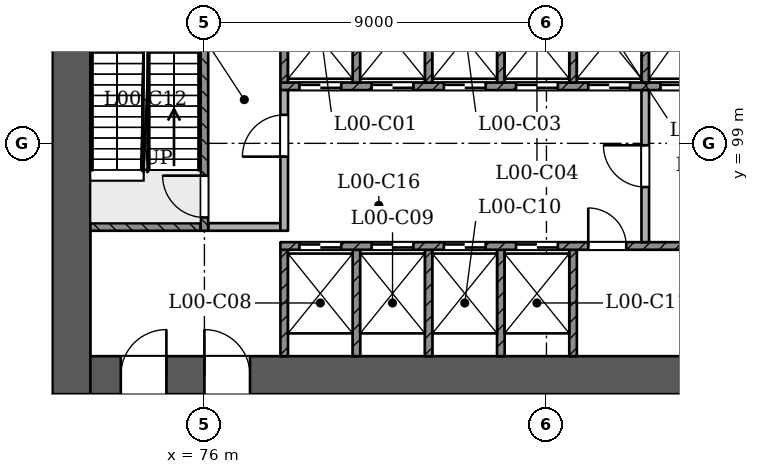
"""IFC4 building model, lengths in metres.
Left out: names, types, materials, properties, quantities, classifications, styles, units other than length and angle.
Written with IfcOpenShell. Run it as: python <this file> out.ifc"""

import sys

from ifc_helpers import new_model, si_unit, direction, frame, frame_2d, origin, place, context, subcontext, project, spatial, rectangle, extrude, element, fill, save


model = new_model("IFC4")
c1 = context("Model", 3, precision=1e-05, world=origin(), true_north=direction((0.0, 1.0)))
c2 = subcontext(c1, "Body", "Model", "MODEL_VIEW")
j1 = project(units=[si_unit("LENGTHUNIT", "METRE"), si_unit("PLANEANGLEUNIT", "RADIAN")], contexts=[c1])
p1 = place(None, origin())
s1 = spatial("IfcSite", under=j1, at=p1, CompositionType="ELEMENT")
p2 = place(p1, origin())
s2 = spatial("IfcBuilding", under=s1, at=p2, CompositionType="ELEMENT")
p3 = place(p2, origin())
s3 = spatial("IfcBuildingStorey", under=s2, at=p3, CompositionType="ELEMENT", Elevation=0.0)
p4 = place(p3, frame((72.5, 92.9, 0.0), z_axis=(0.0, 0.0, 1.0), x_axis=(1.0, 0.0, 0.0)))
e1 = element("IfcWall", 1, at=p4, inside=s3, PredefinedType="SHEAR", context=c2, shape_type="SweptSolid", body=[
    extrude(rectangle(XDim=25.5, YDim=1.0, at=frame_2d((12.75, 0.0))), origin(), (0.0, 0.0, 1.0), 9.0),
])
p5 = place(p4, frame((1.3, 0.0, 0.0)))
e2 = element("IfcOpeningElement", 2, at=p5, cuts=e1, PredefinedType="OPENING", context=c2, shape_type="SweptSolid", body=[
    extrude(rectangle(XDim=1.2, YDim=2.1, at=frame_2d((0.6, 1.05))), frame((0.0, 0.51, 0.0), z_axis=(0.0, -1.0, 0.0), x_axis=(1.0, 0.0, 0.0)), (0.0, 0.0, 1.0), 1.021),
])
p6 = place(p4, frame((3.5, 0.0, 0.0)))
e3 = element("IfcOpeningElement", 3, at=p6, cuts=e1, PredefinedType="OPENING", context=c2, shape_type="SweptSolid", body=[
    extrude(rectangle(XDim=1.2, YDim=2.1, at=frame_2d((0.6, 1.05))), frame((0.0, 0.51, 0.0), z_axis=(0.0, -1.0, 0.0), x_axis=(1.0, 0.0, 0.0)), (0.0, 0.0, 1.0), 1.021),
])
p7 = place(p4, frame((18.4, 0.0, 0.0)))
e4 = element("IfcOpeningElement", 4, at=p7, cuts=e1, PredefinedType="OPENING", context=c2, shape_type="SweptSolid", body=[
    extrude(rectangle(XDim=1.0, YDim=2.1, at=frame_2d((0.5, 1.05))), frame((0.0, 0.51, 0.0), z_axis=(0.0, -1.0, 0.0), x_axis=(1.0, 0.0, 0.0)), (0.0, 0.0, 1.0), 1.021),
])
p8 = place(p3, frame((72.5, 103.9, 0.0), z_axis=(0.0, 0.0, 1.0), x_axis=(0.0, -1.0, 0.0)))
e5 = element("IfcWall", 5, at=p8, inside=s3, PredefinedType="SHEAR", context=c2, shape_type="SweptSolid", body=[
    extrude(rectangle(XDim=11.5, YDim=1.0, at=frame_2d((5.75, 0.0))), origin(), (0.0, 0.0, 1.0), 9.0),
])
for number, where, z_axis, x_axis in (
    (6, (78.1, 93.4, 0.0), (0.0, 0.0, 1.0), (0.0, 1.0, 0.0)),
    (7, (80.0, 93.4, 0.0), (0.0, 0.0, 1.0), (0.0, 1.0, 0.0)),
    (8, (81.9, 93.4, 0.0), (0.0, 0.0, 1.0), (0.0, 1.0, 0.0)),
    (9, (83.8, 93.4, 0.0), (0.0, 0.0, 1.0), (0.0, 1.0, 0.0)),
    (10, (85.7, 93.4, 0.0), (0.0, 0.0, 1.0), (0.0, 1.0, 0.0)),
):
    element("IfcWall", number, at=place(p3, frame(where, z_axis=z_axis, x_axis=x_axis)), inside=s3, PredefinedType="SOLIDWALL", context=c2, shape_type="SweptSolid", body=[
        extrude(rectangle(XDim=2.8, YDim=0.2, at=frame_2d((1.4, 0.0))), origin(), (0.0, 0.0, 1.0), 8.55),
    ])
p9 = place(p3, frame((78.0, 96.3, 0.0), z_axis=(0.0, 0.0, 1.0), x_axis=(1.0, 0.0, 0.0)))
e11 = element("IfcWall", 11, at=p9, inside=s3, PredefinedType="SOLIDWALL", context=c2, shape_type="SweptSolid", body=[
    extrude(rectangle(XDim=13.5, YDim=0.2, at=frame_2d((6.75, 0.0))), origin(), (0.0, 0.0, 1.0), 8.55),
])
p10 = place(p9, frame((0.5, 0.0, 0.0)))
e12 = element("IfcOpeningElement", 12, at=p10, cuts=e11, PredefinedType="OPENING", context=c2, shape_type="SweptSolid", body=[
    extrude(rectangle(XDim=1.1, YDim=2.1, at=frame_2d((0.55, 1.05))), frame((0.0, 0.11, 0.0), z_axis=(0.0, -1.0, 0.0), x_axis=(1.0, 0.0, 0.0)), (0.0, 0.0, 1.0), 0.221),
])
p11 = place(p9, frame((2.4, 0.0, 0.0)))
e13 = element("IfcOpeningElement", 13, at=p11, cuts=e11, PredefinedType="OPENING", context=c2, shape_type="SweptSolid", body=[
    extrude(rectangle(XDim=1.1, YDim=2.1, at=frame_2d((0.55, 1.05))), frame((0.0, 0.11, 0.0), z_axis=(0.0, -1.0, 0.0), x_axis=(1.0, 0.0, 0.0)), (0.0, 0.0, 1.0), 0.221),
])
p12 = place(p9, frame((4.3, 0.0, 0.0)))
e14 = element("IfcOpeningElement", 14, at=p12, cuts=e11, PredefinedType="OPENING", context=c2, shape_type="SweptSolid", body=[
    extrude(rectangle(XDim=1.1, YDim=2.1, at=frame_2d((0.55, 1.05))), frame((0.0, 0.11, 0.0), z_axis=(0.0, -1.0, 0.0), x_axis=(1.0, 0.0, 0.0)), (0.0, 0.0, 1.0), 0.221),
])
p13 = place(p9, frame((6.2, 0.0, 0.0)))
e15 = element("IfcOpeningElement", 15, at=p13, cuts=e11, PredefinedType="OPENING", context=c2, shape_type="SweptSolid", body=[
    extrude(rectangle(XDim=1.1, YDim=2.1, at=frame_2d((0.55, 1.05))), frame((0.0, 0.11, 0.0), z_axis=(0.0, -1.0, 0.0), x_axis=(1.0, 0.0, 0.0)), (0.0, 0.0, 1.0), 0.221),
])
p14 = place(p9, frame((8.1, 0.0, 0.0)))
e16 = element("IfcOpeningElement", 16, at=p14, cuts=e11, PredefinedType="OPENING", context=c2, shape_type="SweptSolid", body=[
    extrude(rectangle(XDim=1.0, YDim=2.1, at=frame_2d((0.5, 1.05))), frame((0.0, 0.11, 0.0), z_axis=(0.0, -1.0, 0.0), x_axis=(1.0, 0.0, 0.0)), (0.0, 0.0, 1.0), 0.221),
])
p15 = place(p3, frame((87.6, 96.4, 0.0), z_axis=(0.0, 0.0, 1.0), x_axis=(0.0, 1.0, 0.0)))
e17 = element("IfcWall", 17, at=p15, inside=s3, PredefinedType="PARTITIONING", context=c2, shape_type="SweptSolid", body=[
    extrude(rectangle(XDim=4.0, YDim=0.2, at=frame_2d((2.0, 0.0))), origin(), (0.0, 0.0, 1.0), 8.55),
])
p16 = place(p15, frame((1.45, 0.0, 0.0)))
e18 = element("IfcOpeningElement", 18, at=p16, cuts=e17, PredefinedType="OPENING", context=c2, shape_type="SweptSolid", body=[
    extrude(rectangle(XDim=1.1, YDim=2.1, at=frame_2d((0.55, 1.05))), frame((0.0, 0.11, 0.0), z_axis=(0.0, -1.0, 0.0), x_axis=(1.0, 0.0, 0.0)), (0.0, 0.0, 1.0), 0.221),
])
p17 = place(p3, frame((73.0, 96.8, 0.0), z_axis=(0.0, 0.0, 1.0), x_axis=(1.0, 0.0, 0.0)))
e19 = element("IfcWall", 19, at=p17, inside=s3, PredefinedType="SOLIDWALL", context=c2, shape_type="SweptSolid", body=[
    extrude(rectangle(XDim=2.9, YDim=0.2, at=frame_2d((1.45, 0.0))), origin(), (0.0, 0.0, 1.0), 8.55),
])
p18 = place(p3, frame((76.0, 96.7, 0.0), z_axis=(0.0, 0.0, 1.0), x_axis=(0.0, 1.0, 0.0)))
e20 = element("IfcWall", 20, at=p18, inside=s3, PredefinedType="SOLIDWALL", context=c2, shape_type="SweptSolid", body=[
    extrude(rectangle(XDim=6.7, YDim=0.2, at=frame_2d((3.35, 0.0))), origin(), (0.0, 0.0, 1.0), 8.55),
])
p19 = place(p18, frame((0.35, 0.0, 0.0)))
e21 = element("IfcOpeningElement", 21, at=p19, cuts=e20, PredefinedType="OPENING", context=c2, shape_type="SweptSolid", body=[
    extrude(rectangle(XDim=1.1, YDim=2.1, at=frame_2d((0.55, 1.05))), frame((0.0, 0.11, 0.0), z_axis=(0.0, -1.0, 0.0), x_axis=(1.0, 0.0, 0.0)), (0.0, 0.0, 1.0), 0.221),
])
p20 = place(p3, frame((76.1, 96.8, 0.0), z_axis=(0.0, 0.0, 1.0), x_axis=(1.0, 0.0, 0.0)))
e22 = element("IfcWall", 22, at=p20, inside=s3, PredefinedType="PARTITIONING", context=c2, shape_type="SweptSolid", body=[
    extrude(rectangle(XDim=1.9, YDim=0.2, at=frame_2d((0.95, 0.0))), origin(), (0.0, 0.0, 1.0), 8.55),
])
p21 = place(p3, frame((78.1, 96.7, 0.0), z_axis=(0.0, 0.0, 1.0), x_axis=(0.0, 1.0, 0.0)))
e23 = element("IfcWall", 23, at=p21, inside=s3, PredefinedType="PARTITIONING", context=c2, shape_type="SweptSolid", body=[
    extrude(rectangle(XDim=3.7, YDim=0.2, at=frame_2d((1.85, 0.0))), origin(), (0.0, 0.0, 1.0), 8.55),
])
p22 = place(p21, frame((1.95, 0.0, 0.0)))
e24 = element("IfcOpeningElement", 24, at=p22, cuts=e23, PredefinedType="OPENING", context=c2, shape_type="SweptSolid", body=[
    extrude(rectangle(XDim=1.1, YDim=2.1, at=frame_2d((0.55, 1.05))), frame((0.0, 0.11, 0.0), z_axis=(0.0, -1.0, 0.0), x_axis=(1.0, 0.0, 0.0)), (0.0, 0.0, 1.0), 0.221),
])
p23 = place(p3, frame((78.0, 100.5, 0.0), z_axis=(0.0, 0.0, 1.0), x_axis=(1.0, 0.0, 0.0)))
e25 = element("IfcWall", 25, at=p23, inside=s3, PredefinedType="SOLIDWALL", context=c2, shape_type="SweptSolid", body=[
    extrude(rectangle(XDim=13.5, YDim=0.2, at=frame_2d((6.75, 0.0))), origin(), (0.0, 0.0, 1.0), 8.55),
])
p24 = place(p23, frame((0.5, 0.0, 0.0)))
e26 = element("IfcOpeningElement", 26, at=p24, cuts=e25, PredefinedType="OPENING", context=c2, shape_type="SweptSolid", body=[
    extrude(rectangle(XDim=1.1, YDim=2.1, at=frame_2d((0.55, 1.05))), frame((0.0, 0.11, 0.0), z_axis=(0.0, -1.0, 0.0), x_axis=(1.0, 0.0, 0.0)), (0.0, 0.0, 1.0), 0.221),
])
p25 = place(p23, frame((2.4, 0.0, 0.0)))
e27 = element("IfcOpeningElement", 27, at=p25, cuts=e25, PredefinedType="OPENING", context=c2, shape_type="SweptSolid", body=[
    extrude(rectangle(XDim=1.1, YDim=2.1, at=frame_2d((0.55, 1.05))), frame((0.0, 0.11, 0.0), z_axis=(0.0, -1.0, 0.0), x_axis=(1.0, 0.0, 0.0)), (0.0, 0.0, 1.0), 0.221),
])
p26 = place(p23, frame((4.3, 0.0, 0.0)))
e28 = element("IfcOpeningElement", 28, at=p26, cuts=e25, PredefinedType="OPENING", context=c2, shape_type="SweptSolid", body=[
    extrude(rectangle(XDim=1.1, YDim=2.1, at=frame_2d((0.55, 1.05))), frame((0.0, 0.11, 0.0), z_axis=(0.0, -1.0, 0.0), x_axis=(1.0, 0.0, 0.0)), (0.0, 0.0, 1.0), 0.221),
])
p27 = place(p23, frame((6.2, 0.0, 0.0)))
e29 = element("IfcOpeningElement", 29, at=p27, cuts=e25, PredefinedType="OPENING", context=c2, shape_type="SweptSolid", body=[
    extrude(rectangle(XDim=1.1, YDim=2.1, at=frame_2d((0.55, 1.05))), frame((0.0, 0.11, 0.0), z_axis=(0.0, -1.0, 0.0), x_axis=(1.0, 0.0, 0.0)), (0.0, 0.0, 1.0), 0.221),
])
p28 = place(p23, frame((8.1, 0.0, 0.0)))
e30 = element("IfcOpeningElement", 30, at=p28, cuts=e25, PredefinedType="OPENING", context=c2, shape_type="SweptSolid", body=[
    extrude(rectangle(XDim=1.1, YDim=2.1, at=frame_2d((0.55, 1.05))), frame((0.0, 0.11, 0.0), z_axis=(0.0, -1.0, 0.0), x_axis=(1.0, 0.0, 0.0)), (0.0, 0.0, 1.0), 0.221),
])
p29 = place(p23, frame((10.0, 0.0, 0.0)))
e31 = element("IfcOpeningElement", 31, at=p29, cuts=e25, PredefinedType="OPENING", context=c2, shape_type="SweptSolid", body=[
    extrude(rectangle(XDim=1.1, YDim=2.1, at=frame_2d((0.55, 1.05))), frame((0.0, 0.11, 0.0), z_axis=(0.0, -1.0, 0.0), x_axis=(1.0, 0.0, 0.0)), (0.0, 0.0, 1.0), 0.221),
])
p30 = place(p23, frame((11.9, 0.0, 0.0)))
e32 = element("IfcOpeningElement", 32, at=p30, cuts=e25, PredefinedType="OPENING", context=c2, shape_type="SweptSolid", body=[
    extrude(rectangle(XDim=1.1, YDim=2.1, at=frame_2d((0.55, 1.05))), frame((0.0, 0.11, 0.0), z_axis=(0.0, -1.0, 0.0), x_axis=(1.0, 0.0, 0.0)), (0.0, 0.0, 1.0), 0.221),
])
for number, where, z_axis, x_axis in (
    (33, (78.1, 100.6, 0.0), (0.0, 0.0, 1.0), (0.0, 1.0, 0.0)),
    (34, (80.0, 100.6, 0.0), (0.0, 0.0, 1.0), (0.0, 1.0, 0.0)),
    (35, (81.9, 100.6, 0.0), (0.0, 0.0, 1.0), (0.0, 1.0, 0.0)),
    (36, (83.8, 100.6, 0.0), (0.0, 0.0, 1.0), (0.0, 1.0, 0.0)),
    (37, (85.7, 100.6, 0.0), (0.0, 0.0, 1.0), (0.0, 1.0, 0.0)),
    (38, (87.6, 100.6, 0.0), (0.0, 0.0, 1.0), (0.0, 1.0, 0.0)),
):
    element("IfcWall", number, at=place(p3, frame(where, z_axis=z_axis, x_axis=x_axis)), inside=s3, PredefinedType="SOLIDWALL", context=c2, shape_type="SweptSolid", body=[
        extrude(rectangle(XDim=2.8, YDim=0.2, at=frame_2d((1.4, 0.0))), origin(), (0.0, 0.0, 1.0), 8.55),
    ])
p31 = place(p24, origin())
e39 = element("IfcDoor", 39, at=p31, inside=s3, OperationType="SLIDING_TO_RIGHT", PredefinedType="NOTDEFINED", context=c2, shape_type="SweptSolid", body=[
    extrude(rectangle(XDim=1.1, YDim=2.1, at=frame_2d((0.55, 1.05))), frame((0.0, 0.025, 0.0), z_axis=(0.0, -1.0, 0.0), x_axis=(1.0, 0.0, 0.0)), (0.0, 0.0, 1.0), 0.05),
])
fill(e26, e39)
p32 = place(p25, origin())
e40 = element("IfcDoor", 40, at=p32, inside=s3, OperationType="SLIDING_TO_LEFT", PredefinedType="NOTDEFINED", context=c2, shape_type="SweptSolid", body=[
    extrude(rectangle(XDim=1.1, YDim=2.1, at=frame_2d((0.55, 1.05))), frame((0.0, 0.025, 0.0), z_axis=(0.0, -1.0, 0.0), x_axis=(1.0, 0.0, 0.0)), (0.0, 0.0, 1.0), 0.05),
])
fill(e27, e40)
p33 = place(p26, origin())
e41 = element("IfcDoor", 41, at=p33, inside=s3, OperationType="SLIDING_TO_RIGHT", PredefinedType="NOTDEFINED", context=c2, shape_type="SweptSolid", body=[
    extrude(rectangle(XDim=1.1, YDim=2.1, at=frame_2d((0.55, 1.05))), frame((0.0, 0.025, 0.0), z_axis=(0.0, -1.0, 0.0), x_axis=(1.0, 0.0, 0.0)), (0.0, 0.0, 1.0), 0.05),
])
fill(e28, e41)
p34 = place(p27, origin())
e42 = element("IfcDoor", 42, at=p34, inside=s3, OperationType="SLIDING_TO_LEFT", PredefinedType="NOTDEFINED", context=c2, shape_type="SweptSolid", body=[
    extrude(rectangle(XDim=1.1, YDim=2.1, at=frame_2d((0.55, 1.05))), frame((0.0, 0.025, 0.0), z_axis=(0.0, -1.0, 0.0), x_axis=(1.0, 0.0, 0.0)), (0.0, 0.0, 1.0), 0.05),
])
fill(e29, e42)
p35 = place(p28, origin())
e43 = element("IfcDoor", 43, at=p35, inside=s3, OperationType="SLIDING_TO_RIGHT", PredefinedType="NOTDEFINED", context=c2, shape_type="SweptSolid", body=[
    extrude(rectangle(XDim=1.1, YDim=2.1, at=frame_2d((0.55, 1.05))), frame((0.0, 0.025, 0.0), z_axis=(0.0, -1.0, 0.0), x_axis=(1.0, 0.0, 0.0)), (0.0, 0.0, 1.0), 0.05),
])
fill(e30, e43)
p36 = place(p10, origin())
e44 = element("IfcDoor", 44, at=p36, inside=s3, OperationType="SLIDING_TO_RIGHT", PredefinedType="NOTDEFINED", context=c2, shape_type="SweptSolid", body=[
    extrude(rectangle(XDim=1.1, YDim=2.1, at=frame_2d((0.55, 1.05))), frame((0.0, 0.025, 0.0), z_axis=(0.0, -1.0, 0.0), x_axis=(1.0, 0.0, 0.0)), (0.0, 0.0, 1.0), 0.05),
])
fill(e12, e44)
p37 = place(p11, origin())
e45 = element("IfcDoor", 45, at=p37, inside=s3, OperationType="SLIDING_TO_LEFT", PredefinedType="NOTDEFINED", context=c2, shape_type="SweptSolid", body=[
    extrude(rectangle(XDim=1.1, YDim=2.1, at=frame_2d((0.55, 1.05))), frame((0.0, 0.025, 0.0), z_axis=(0.0, -1.0, 0.0), x_axis=(1.0, 0.0, 0.0)), (0.0, 0.0, 1.0), 0.05),
])
fill(e13, e45)
p38 = place(p12, origin())
e46 = element("IfcDoor", 46, at=p38, inside=s3, OperationType="SLIDING_TO_RIGHT", PredefinedType="NOTDEFINED", context=c2, shape_type="SweptSolid", body=[
    extrude(rectangle(XDim=1.1, YDim=2.1, at=frame_2d((0.55, 1.05))), frame((0.0, 0.025, 0.0), z_axis=(0.0, -1.0, 0.0), x_axis=(1.0, 0.0, 0.0)), (0.0, 0.0, 1.0), 0.05),
])
fill(e14, e46)
p39 = place(p13, origin())
e47 = element("IfcDoor", 47, at=p39, inside=s3, OperationType="SLIDING_TO_LEFT", PredefinedType="NOTDEFINED", context=c2, shape_type="SweptSolid", body=[
    extrude(rectangle(XDim=1.1, YDim=2.1, at=frame_2d((0.55, 1.05))), frame((0.0, 0.025, 0.0), z_axis=(0.0, -1.0, 0.0), x_axis=(1.0, 0.0, 0.0)), (0.0, 0.0, 1.0), 0.05),
])
fill(e15, e47)
p40 = place(p29, origin())
e48 = element("IfcDoor", 48, at=p40, inside=s3, OperationType="SLIDING_TO_RIGHT", PredefinedType="NOTDEFINED", context=c2, shape_type="SweptSolid", body=[
    extrude(rectangle(XDim=1.1, YDim=2.1, at=frame_2d((0.55, 1.05))), frame((0.0, 0.025, 0.0), z_axis=(0.0, -1.0, 0.0), x_axis=(1.0, 0.0, 0.0)), (0.0, 0.0, 1.0), 0.05),
])
fill(e31, e48)
p41 = place(p19, origin())
e49 = element("IfcDoor", 49, at=p41, inside=s3, OperationType="SINGLE_SWING_RIGHT", PredefinedType="NOTDEFINED", context=c2, shape_type="SweptSolid", body=[
    extrude(rectangle(XDim=1.1, YDim=2.1, at=frame_2d((0.55, 1.05))), frame((0.0, 0.025, 0.0), z_axis=(0.0, -1.0, 0.0), x_axis=(1.0, 0.0, 0.0)), (0.0, 0.0, 1.0), 0.05),
])
fill(e21, e49)
p42 = place(p22, origin())
e50 = element("IfcDoor", 50, at=p42, inside=s3, OperationType="SINGLE_SWING_LEFT", PredefinedType="NOTDEFINED", context=c2, shape_type="SweptSolid", body=[
    extrude(rectangle(XDim=1.1, YDim=2.1, at=frame_2d((0.55, 1.05))), frame((0.0, 0.025, 0.0), z_axis=(0.0, -1.0, 0.0), x_axis=(1.0, 0.0, 0.0)), (0.0, 0.0, 1.0), 0.05),
])
fill(e24, e50)
p43 = place(p16, origin())
e51 = element("IfcDoor", 51, at=p43, inside=s3, OperationType="SINGLE_SWING_RIGHT", PredefinedType="NOTDEFINED", context=c2, shape_type="SweptSolid", body=[
    extrude(rectangle(XDim=1.1, YDim=2.1, at=frame_2d((0.55, 1.05))), frame((0.0, 0.025, 0.0), z_axis=(0.0, -1.0, 0.0), x_axis=(1.0, 0.0, 0.0)), (0.0, 0.0, 1.0), 0.05),
])
fill(e18, e51)
p44 = place(p5, origin())
e52 = element("IfcDoor", 52, at=p44, inside=s3, OperationType="SINGLE_SWING_RIGHT", PredefinedType="NOTDEFINED", context=c2, shape_type="SweptSolid", body=[
    extrude(rectangle(XDim=1.2, YDim=2.1, at=frame_2d((0.6, 1.05))), frame((0.0, 0.025, 0.0), z_axis=(0.0, -1.0, 0.0), x_axis=(1.0, 0.0, 0.0)), (0.0, 0.0, 1.0), 0.05),
])
fill(e2, e52)
p45 = place(p6, origin())
e53 = element("IfcDoor", 53, at=p45, inside=s3, OperationType="SINGLE_SWING_LEFT", PredefinedType="NOTDEFINED", context=c2, shape_type="SweptSolid", body=[
    extrude(rectangle(XDim=1.2, YDim=2.1, at=frame_2d((0.6, 1.05))), frame((0.0, 0.025, 0.0), z_axis=(0.0, -1.0, 0.0), x_axis=(1.0, 0.0, 0.0)), (0.0, 0.0, 1.0), 0.05),
])
fill(e3, e53)
p46 = place(p14, origin())
e54 = element("IfcDoor", 54, at=p46, inside=s3, OperationType="SINGLE_SWING_LEFT", PredefinedType="NOTDEFINED", context=c2, shape_type="SweptSolid", body=[
    extrude(rectangle(XDim=1.0, YDim=2.1, at=frame_2d((0.5, 1.05))), frame((0.0, 0.025, 0.0), z_axis=(0.0, -1.0, 0.0), x_axis=(1.0, 0.0, 0.0)), (0.0, 0.0, 1.0), 0.05),
])
fill(e16, e54)
save(model, sys.argv[1])
